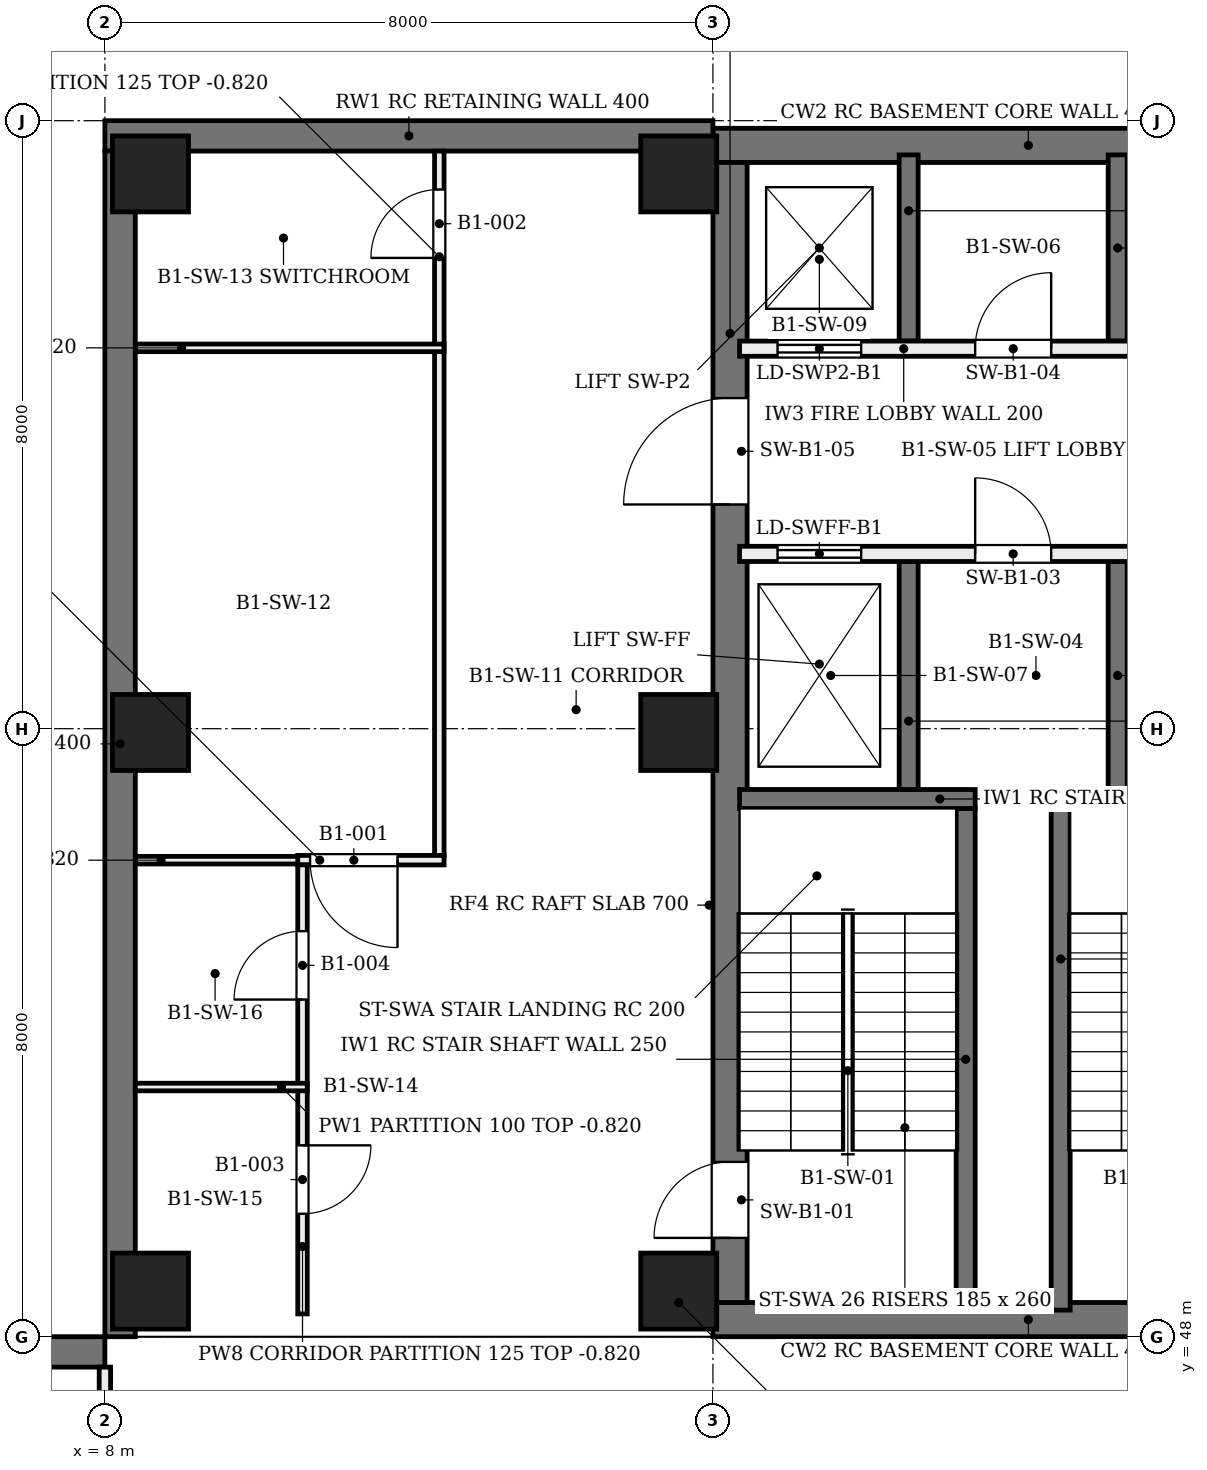
"""IFC4 building model, lengths in metres.
Left out: names, types, materials, properties, quantities, classifications, styles, units other than length and angle.
Written with IfcOpenShell. Run it as: python <this file> out.ifc"""

import sys

from ifc_helpers import new_model, si_unit, direction, frame, frame_2d, origin, origin_2d, place, context, subcontext, project, spatial, rectangle, extrude, element, fill, save


model = new_model("IFC4")
c1 = context("Model", 3, precision=1e-05, world=origin(), true_north=direction((0.0, 1.0)))
c2 = subcontext(c1, "Body", "Model", "MODEL_VIEW")
j1 = project(units=[si_unit("LENGTHUNIT", "METRE"), si_unit("PLANEANGLEUNIT", "RADIAN")], contexts=[c1])
p1 = place(None, origin())
s1 = spatial("IfcSite", under=j1, at=p1, CompositionType="ELEMENT")
p2 = place(p1, origin())
s2 = spatial("IfcBuilding", under=s1, at=p2, CompositionType="ELEMENT")
p3 = place(p2, frame((0.0, 0.0, -4.8)))
s3 = spatial("IfcBuildingStorey", under=s2, at=p3, CompositionType="ELEMENT", Elevation=-4.8)
for number, where, z_axis, x_axis in (
    (1, (16.0, 48.225, 0.0), (0.0, 0.0, 1.0), (1.0, 0.0, 0.0)),
    (2, (16.0, 63.675, 0.0), (0.0, 0.0, 1.0), (1.0, 0.0, 0.0)),
):
    element("IfcWall", number, at=place(p3, frame(where, z_axis=z_axis, x_axis=x_axis)), inside=s3, PredefinedType="SHEAR", context=c2, shape_type="SweptSolid", body=[
        extrude(rectangle(XDim=8.3, YDim=0.45, at=frame_2d((4.15, 0.0))), origin(), (0.0, 0.0, 1.0), 4.58),
    ])
p4 = place(p3, frame((16.225, 48.45, 0.0), z_axis=(0.0, 0.0, 1.0), x_axis=(0.0, 1.0, 0.0)))
e3 = element("IfcWall", 3, at=p4, inside=s3, PredefinedType="SHEAR", context=c2, shape_type="SweptSolid", body=[
    extrude(rectangle(XDim=15.0, YDim=0.45, at=frame_2d((7.5, 0.0))), origin(), (0.0, 0.0, 1.0), 4.58),
])
p5 = place(p4, frame((0.85, 0.0, 0.0)))
e4 = element("IfcOpeningElement", 4, at=p5, cuts=e3, PredefinedType="OPENING", context=c2, shape_type="SweptSolid", body=[
    extrude(rectangle(XDim=1.0, YDim=2.1, at=frame_2d((0.5, 1.05))), frame((0.0, 0.235, 0.0), z_axis=(0.0, -1.0, 0.0), x_axis=(1.0, 0.0, 0.0)), (0.0, 0.0, 1.0), 0.47),
])
p6 = place(p4, frame((10.5, 0.0, 0.0)))
e5 = element("IfcOpeningElement", 5, at=p6, cuts=e3, PredefinedType="OPENING", context=c2, shape_type="SweptSolid", body=[
    extrude(rectangle(XDim=1.4, YDim=2.1, at=frame_2d((0.7, 1.05))), frame((0.0, 0.235, 0.0), z_axis=(0.0, -1.0, 0.0), x_axis=(1.0, 0.0, 0.0)), (0.0, 0.0, 1.0), 0.47),
])
for number, where, z_axis, x_axis in (
    (6, (8.6, 48.6, 0.0), (0.0, 0.0, 1.0), (1.0, 0.0, 0.0)),
    (7, (8.6, 55.95, 0.0), (0.0, 0.0, 1.0), (1.0, 0.0, 0.0)),
    (8, (8.6, 63.3, 0.0), (0.0, 0.0, 1.0), (1.0, 0.0, 0.0)),
    (9, (15.55, 48.6, 0.0), (0.0, 0.0, 1.0), (1.0, 0.0, 0.0)),
    (10, (15.55, 55.95, 0.0), (0.0, 0.0, 1.0), (1.0, 0.0, 0.0)),
    (11, (15.55, 63.3, 0.0), (0.0, 0.0, 1.0), (1.0, 0.0, 0.0)),
):
    element("IfcColumn", number, at=place(p3, frame(where, z_axis=z_axis, x_axis=x_axis)), inside=s3, PredefinedType="COLUMN", context=c2, shape_type="SweptSolid", body=[
        extrude(rectangle(XDim=1.0, YDim=1.0, at=origin_2d()), origin(), (0.0, 0.0, 1.0), 4.8),
    ])
p7 = place(p3, frame((0.0, 47.8, 0.0), z_axis=(0.0, 0.0, 1.0), x_axis=(1.0, 0.0, 0.0)))
e12 = element("IfcWall", 12, at=p7, inside=s3, PredefinedType="SOLIDWALL", context=c2, shape_type="SweptSolid", body=[
    extrude(rectangle(XDim=8.0, YDim=0.4, at=frame_2d((4.0, 0.0))), origin(), (0.0, 0.0, 1.0), 4.38),
])
p8 = place(p3, frame((8.0, 63.8, 0.0), z_axis=(0.0, 0.0, 1.0), x_axis=(1.0, 0.0, 0.0)))
e13 = element("IfcWall", 13, at=p8, inside=s3, PredefinedType="SOLIDWALL", context=c2, shape_type="SweptSolid", body=[
    extrude(rectangle(XDim=8.0, YDim=0.4, at=frame_2d((4.0, 0.0))), origin(), (0.0, 0.0, 1.0), 4.55),
])
p9 = place(p3, frame((8.2, 48.0, 0.0), z_axis=(0.0, 0.0, 1.0), x_axis=(0.0, 1.0, 0.0)))
e14 = element("IfcWall", 14, at=p9, inside=s3, PredefinedType="SOLIDWALL", context=c2, shape_type="SweptSolid", body=[
    extrude(rectangle(XDim=15.6, YDim=0.4, at=frame_2d((7.8, 0.0))), origin(), (0.0, 0.0, 1.0), 4.55),
])
for number, where, z_axis, x_axis in (
    (15, (19.325, 48.35, 0.0), (0.0, 0.0, 1.0), (0.0, 1.0, 0.0)),
    (16, (20.575, 48.35, 0.0), (0.0, 0.0, 1.0), (0.0, 1.0, 0.0)),
):
    element("IfcWall", number, at=place(p3, frame(where, z_axis=z_axis, x_axis=x_axis)), inside=s3, PredefinedType="SOLIDWALL", context=c2, shape_type="SweptSolid", body=[
        extrude(rectangle(XDim=6.6, YDim=0.25, at=frame_2d((3.3, 0.0))), origin(), (0.0, 0.0, 1.0), 4.55),
    ])
p10 = place(p3, frame((16.35, 55.075, 0.0), z_axis=(0.0, 0.0, 1.0), x_axis=(1.0, 0.0, 0.0)))
e17 = element("IfcWall", 17, at=p10, inside=s3, PredefinedType="SOLIDWALL", context=c2, shape_type="SweptSolid", body=[
    extrude(rectangle(XDim=3.1, YDim=0.25, at=frame_2d((1.55, 0.0))), origin(), (0.0, 0.0, 1.0), 4.55),
])
p11 = place(p3, frame((20.45, 55.075, 0.0), z_axis=(0.0, 0.0, 1.0), x_axis=(1.0, 0.0, 0.0)))
e18 = element("IfcWall", 18, at=p11, inside=s3, PredefinedType="SOLIDWALL", context=c2, shape_type="SweptSolid", body=[
    extrude(rectangle(XDim=3.1, YDim=0.25, at=frame_2d((1.55, 0.0))), origin(), (0.0, 0.0, 1.0), 4.55),
])
p12 = place(p3, frame((18.575, 55.2, 0.0), z_axis=(0.0, 0.0, 1.0), x_axis=(0.0, 1.0, 0.0)))
e19 = element("IfcWall", 19, at=p12, inside=s3, PredefinedType="SOLIDWALL", context=c2, shape_type="SweptSolid", body=[
    extrude(rectangle(XDim=3.0, YDim=0.25, at=frame_2d((1.5, 0.0))), origin(), (0.0, 0.0, 1.0), 4.55),
])
p13 = place(p3, frame((18.575, 61.1, 0.0), z_axis=(0.0, 0.0, 1.0), x_axis=(0.0, 1.0, 0.0)))
e20 = element("IfcWall", 20, at=p13, inside=s3, PredefinedType="SOLIDWALL", context=c2, shape_type="SweptSolid", body=[
    extrude(rectangle(XDim=2.45, YDim=0.25, at=frame_2d((1.225, 0.0))), origin(), (0.0, 0.0, 1.0), 4.55),
])
p14 = place(p3, frame((21.325, 55.2, 0.0), z_axis=(0.0, 0.0, 1.0), x_axis=(0.0, 1.0, 0.0)))
e21 = element("IfcWall", 21, at=p14, inside=s3, PredefinedType="SOLIDWALL", context=c2, shape_type="SweptSolid", body=[
    extrude(rectangle(XDim=3.0, YDim=0.25, at=frame_2d((1.5, 0.0))), origin(), (0.0, 0.0, 1.0), 4.55),
])
p15 = place(p3, frame((21.325, 61.1, 0.0), z_axis=(0.0, 0.0, 1.0), x_axis=(0.0, 1.0, 0.0)))
e22 = element("IfcWall", 22, at=p15, inside=s3, PredefinedType="SOLIDWALL", context=c2, shape_type="SweptSolid", body=[
    extrude(rectangle(XDim=2.45, YDim=0.25, at=frame_2d((1.225, 0.0))), origin(), (0.0, 0.0, 1.0), 4.55),
])
p16 = place(p3, frame((16.35, 58.3, 0.0), z_axis=(0.0, 0.0, 1.0), x_axis=(1.0, 0.0, 0.0)))
e23 = element("IfcWall", 23, at=p16, inside=s3, PredefinedType="SOLIDWALL", context=c2, shape_type="SweptSolid", body=[
    extrude(rectangle(XDim=7.2, YDim=0.2, at=frame_2d((3.6, 0.0))), origin(), (0.0, 0.0, 1.0), 4.55),
])
p17 = place(p16, frame((0.5, 0.0, 0.0)))
e24 = element("IfcOpeningElement", 24, at=p17, cuts=e23, PredefinedType="OPENING", context=c2, shape_type="SweptSolid", body=[
    extrude(rectangle(XDim=1.1, YDim=2.1, at=frame_2d((0.55, 1.05))), frame((0.0, 0.11, 0.0), z_axis=(0.0, -1.0, 0.0), x_axis=(1.0, 0.0, 0.0)), (0.0, 0.0, 1.0), 0.22),
])
p18 = place(p16, frame((5.6, 0.0, 0.0)))
e25 = element("IfcOpeningElement", 25, at=p18, cuts=e23, PredefinedType="OPENING", context=c2, shape_type="SweptSolid", body=[
    extrude(rectangle(XDim=1.1, YDim=2.1, at=frame_2d((0.55, 1.05))), frame((0.0, 0.11, 0.0), z_axis=(0.0, -1.0, 0.0), x_axis=(1.0, 0.0, 0.0)), (0.0, 0.0, 1.0), 0.22),
])
p19 = place(p16, frame((3.1, 0.0, 0.0)))
e26 = element("IfcOpeningElement", 26, at=p19, cuts=e23, PredefinedType="OPENING", context=c2, shape_type="SweptSolid", body=[
    extrude(rectangle(XDim=1.0, YDim=2.1, at=frame_2d((0.5, 1.05))), frame((0.0, 0.11, 0.0), z_axis=(0.0, -1.0, 0.0), x_axis=(1.0, 0.0, 0.0)), (0.0, 0.0, 1.0), 0.22),
])
p20 = place(p3, frame((16.35, 61.0, 0.0), z_axis=(0.0, 0.0, 1.0), x_axis=(1.0, 0.0, 0.0)))
e27 = element("IfcWall", 27, at=p20, inside=s3, PredefinedType="SOLIDWALL", context=c2, shape_type="SweptSolid", body=[
    extrude(rectangle(XDim=7.2, YDim=0.2, at=frame_2d((3.6, 0.0))), origin(), (0.0, 0.0, 1.0), 4.55),
])
p21 = place(p20, frame((0.5, 0.0, 0.0)))
e28 = element("IfcOpeningElement", 28, at=p21, cuts=e27, PredefinedType="OPENING", context=c2, shape_type="SweptSolid", body=[
    extrude(rectangle(XDim=1.1, YDim=2.1, at=frame_2d((0.55, 1.05))), frame((0.0, 0.11, 0.0), z_axis=(0.0, -1.0, 0.0), x_axis=(1.0, 0.0, 0.0)), (0.0, 0.0, 1.0), 0.22),
])
p22 = place(p20, frame((5.6, 0.0, 0.0)))
e29 = element("IfcOpeningElement", 29, at=p22, cuts=e27, PredefinedType="OPENING", context=c2, shape_type="SweptSolid", body=[
    extrude(rectangle(XDim=1.1, YDim=2.1, at=frame_2d((0.55, 1.05))), frame((0.0, 0.11, 0.0), z_axis=(0.0, -1.0, 0.0), x_axis=(1.0, 0.0, 0.0)), (0.0, 0.0, 1.0), 0.22),
])
p23 = place(p20, frame((3.1, 0.0, 0.0)))
e30 = element("IfcOpeningElement", 30, at=p23, cuts=e27, PredefinedType="OPENING", context=c2, shape_type="SweptSolid", body=[
    extrude(rectangle(XDim=1.0, YDim=2.1, at=frame_2d((0.5, 1.05))), frame((0.0, 0.11, 0.0), z_axis=(0.0, -1.0, 0.0), x_axis=(1.0, 0.0, 0.0)), (0.0, 0.0, 1.0), 0.22),
])
p24 = place(p3, frame((12.4, 54.333, 0.0), z_axis=(0.0, 0.0, 1.0), x_axis=(0.0, 1.0, 0.0)))
e31 = element("IfcWall", 31, at=p24, inside=s3, PredefinedType="PARTITIONING", context=c2, shape_type="SweptSolid", body=[
    extrude(rectangle(XDim=9.267, YDim=0.125, at=frame_2d((4.634, 0.0))), origin(), (0.0, 0.0, 1.0), 3.98),
])
p25 = place(p24, frame((7.862, 0.0, 0.0)))
e32 = element("IfcOpeningElement", 32, at=p25, cuts=e31, PredefinedType="OPENING", context=c2, shape_type="SweptSolid", body=[
    extrude(rectangle(XDim=0.9, YDim=2.1, at=frame_2d((0.45, 1.05))), frame((0.0, 0.073, 0.0), z_axis=(0.0, -1.0, 0.0), x_axis=(1.0, 0.0, 0.0)), (0.0, 0.0, 1.0), 0.145),
])
p26 = place(p3, frame((8.4, 54.27, 0.0), z_axis=(0.0, 0.0, 1.0), x_axis=(1.0, 0.0, 0.0)))
e33 = element("IfcWall", 33, at=p26, inside=s3, PredefinedType="PARTITIONING", context=c2, shape_type="SweptSolid", body=[
    extrude(rectangle(XDim=2.263, YDim=0.1, at=frame_2d((1.131, 0.0))), origin(), (0.0, 0.0, 1.0), 3.98),
])
p27 = place(p3, frame((10.538, 54.27, 0.0), z_axis=(0.0, 0.0, 1.0), x_axis=(1.0, 0.0, 0.0)))
e34 = element("IfcWall", 34, at=p27, inside=s3, PredefinedType="PARTITIONING", context=c2, shape_type="SweptSolid", body=[
    extrude(rectangle(XDim=1.925, YDim=0.125, at=frame_2d((0.962, 0.0))), origin(), (0.0, 0.0, 1.0), 4.56),
])
p28 = place(p27, frame((0.163, 0.0, 0.0)))
e35 = element("IfcOpeningElement", 35, at=p28, cuts=e34, PredefinedType="OPENING", context=c2, shape_type="SweptSolid", body=[
    extrude(rectangle(XDim=1.15, YDim=2.1, at=frame_2d((0.575, 1.05))), frame((0.0, 0.073, 0.0), z_axis=(0.0, -1.0, 0.0), x_axis=(1.0, 0.0, 0.0)), (0.0, 0.0, 1.0), 0.145),
])
p29 = place(p3, frame((8.4, 61.011, 0.0), z_axis=(0.0, 0.0, 1.0), x_axis=(1.0, 0.0, 0.0)))
e36 = element("IfcWall", 36, at=p29, inside=s3, PredefinedType="PARTITIONING", context=c2, shape_type="SweptSolid", body=[
    extrude(rectangle(XDim=4.062, YDim=0.1, at=frame_2d((2.031, 0.0))), origin(), (0.0, 0.0, 1.0), 3.98),
])
p30 = place(p3, frame((10.6, 48.3, 0.0), z_axis=(0.0, 0.0, 1.0), x_axis=(0.0, 1.0, 0.0)))
e37 = element("IfcWall", 37, at=p30, inside=s3, PredefinedType="PARTITIONING", context=c2, shape_type="SweptSolid", body=[
    extrude(rectangle(XDim=5.908, YDim=0.125, at=frame_2d((2.954, 0.0))), origin(), (0.0, 0.0, 1.0), 3.98),
])
p31 = place(p30, frame((1.318, 0.0, 0.0)))
e38 = element("IfcOpeningElement", 38, at=p31, cuts=e37, PredefinedType="OPENING", context=c2, shape_type="SweptSolid", body=[
    extrude(rectangle(XDim=0.9, YDim=2.1, at=frame_2d((0.45, 1.05))), frame((0.0, 0.073, 0.0), z_axis=(0.0, -1.0, 0.0), x_axis=(1.0, 0.0, 0.0)), (0.0, 0.0, 1.0), 0.145),
])
p32 = place(p30, frame((4.136, 0.0, 0.0)))
e39 = element("IfcOpeningElement", 39, at=p32, cuts=e37, PredefinedType="OPENING", context=c2, shape_type="SweptSolid", body=[
    extrude(rectangle(XDim=0.9, YDim=2.1, at=frame_2d((0.45, 1.05))), frame((0.0, 0.073, 0.0), z_axis=(0.0, -1.0, 0.0), x_axis=(1.0, 0.0, 0.0)), (0.0, 0.0, 1.0), 0.145),
])
p33 = place(p3, frame((8.4, 51.285, 0.0), z_axis=(0.0, 0.0, 1.0), x_axis=(1.0, 0.0, 0.0)))
e40 = element("IfcWall", 40, at=p33, inside=s3, PredefinedType="PARTITIONING", context=c2, shape_type="SweptSolid", body=[
    extrude(rectangle(XDim=2.263, YDim=0.1, at=frame_2d((1.131, 0.0))), origin(), (0.0, 0.0, 1.0), 3.98),
])
p34 = place(p3, frame((8.0, 46.655, 0.0), z_axis=(0.0, 0.0, 1.0), x_axis=(0.0, 1.0, 0.0)))
e41 = element("IfcWall", 41, at=p34, inside=s3, PredefinedType="PARTITIONING", context=c2, shape_type="SweptSolid", body=[
    extrude(rectangle(XDim=0.945, YDim=0.15, at=frame_2d((0.473, 0.0))), origin(), (0.0, 0.0, 1.0), 4.36),
])
p35 = place(p5, origin())
e42 = element("IfcDoor", 42, at=p35, inside=s3, OperationType="SINGLE_SWING_LEFT", PredefinedType="DOOR", context=c2, shape_type="SweptSolid", body=[
    extrude(rectangle(XDim=1.0, YDim=2.1, at=frame_2d((0.5, 1.05))), frame((0.0, 0.025, 0.0), z_axis=(0.0, -1.0, 0.0), x_axis=(1.0, 0.0, 0.0)), (0.0, 0.0, 1.0), 0.05),
])
fill(e4, e42)
p36 = place(p17, origin())
e43 = element("IfcDoor", 43, at=p36, inside=s3, OperationType="DOUBLE_DOOR_SLIDING", PredefinedType="DOOR", context=c2, shape_type="SweptSolid", body=[
    extrude(rectangle(XDim=1.1, YDim=2.1, at=frame_2d((0.55, 1.05))), frame((0.0, 0.025, 0.0), z_axis=(0.0, -1.0, 0.0), x_axis=(1.0, 0.0, 0.0)), (0.0, 0.0, 1.0), 0.05),
])
fill(e24, e43)
p37 = place(p21, frame((1.1, 0.0, 0.0), z_axis=(0.0, 0.0, 1.0), x_axis=(-1.0, 0.0, 0.0)))
e44 = element("IfcDoor", 44, at=p37, inside=s3, OperationType="DOUBLE_DOOR_SLIDING", PredefinedType="DOOR", context=c2, shape_type="SweptSolid", body=[
    extrude(rectangle(XDim=1.1, YDim=2.1, at=frame_2d((0.55, 1.05))), frame((0.0, 0.025, 0.0), z_axis=(0.0, -1.0, 0.0), x_axis=(1.0, 0.0, 0.0)), (0.0, 0.0, 1.0), 0.05),
])
fill(e28, e44)
p38 = place(p19, origin())
e45 = element("IfcDoor", 45, at=p38, inside=s3, OperationType="SINGLE_SWING_LEFT", PredefinedType="DOOR", context=c2, shape_type="SweptSolid", body=[
    extrude(rectangle(XDim=1.0, YDim=2.1, at=frame_2d((0.5, 1.05))), frame((0.0, 0.025, 0.0), z_axis=(0.0, -1.0, 0.0), x_axis=(1.0, 0.0, 0.0)), (0.0, 0.0, 1.0), 0.05),
])
fill(e26, e45)
p39 = place(p23, frame((1.0, 0.0, 0.0), z_axis=(0.0, 0.0, 1.0), x_axis=(-1.0, 0.0, 0.0)))
e46 = element("IfcDoor", 46, at=p39, inside=s3, OperationType="SINGLE_SWING_RIGHT", PredefinedType="DOOR", context=c2, shape_type="SweptSolid", body=[
    extrude(rectangle(XDim=1.0, YDim=2.1, at=frame_2d((0.5, 1.05))), frame((0.0, 0.025, 0.0), z_axis=(0.0, -1.0, 0.0), x_axis=(1.0, 0.0, 0.0)), (0.0, 0.0, 1.0), 0.05),
])
fill(e30, e46)
p40 = place(p6, origin())
e47 = element("IfcDoor", 47, at=p40, inside=s3, OperationType="SINGLE_SWING_LEFT", PredefinedType="DOOR", context=c2, shape_type="SweptSolid", body=[
    extrude(rectangle(XDim=1.4, YDim=2.1, at=frame_2d((0.7, 1.05))), frame((0.0, 0.025, 0.0), z_axis=(0.0, -1.0, 0.0), x_axis=(1.0, 0.0, 0.0)), (0.0, 0.0, 1.0), 0.05),
])
fill(e5, e47)
p41 = place(p28, origin())
e48 = element("IfcDoor", 48, at=p41, inside=s3, OperationType="SINGLE_SWING_RIGHT", PredefinedType="DOOR", context=c2, shape_type="SweptSolid", body=[
    extrude(rectangle(XDim=1.15, YDim=2.1, at=frame_2d((0.575, 1.05))), frame((0.0, 0.025, 0.0), z_axis=(0.0, -1.0, 0.0), x_axis=(1.0, 0.0, 0.0)), (0.0, 0.0, 1.0), 0.05),
])
fill(e35, e48)
p42 = place(p25, origin())
e49 = element("IfcDoor", 49, at=p42, inside=s3, OperationType="SINGLE_SWING_LEFT", PredefinedType="DOOR", context=c2, shape_type="SweptSolid", body=[
    extrude(rectangle(XDim=0.9, YDim=2.1, at=frame_2d((0.45, 1.05))), frame((0.0, 0.025, 0.0), z_axis=(0.0, -1.0, 0.0), x_axis=(1.0, 0.0, 0.0)), (0.0, 0.0, 1.0), 0.05),
])
fill(e32, e49)
p43 = place(p31, origin())
e50 = element("IfcDoor", 50, at=p43, inside=s3, OperationType="SINGLE_SWING_RIGHT", PredefinedType="DOOR", context=c2, shape_type="SweptSolid", body=[
    extrude(rectangle(XDim=0.9, YDim=2.1, at=frame_2d((0.45, 1.05))), frame((0.0, 0.025, 0.0), z_axis=(0.0, -1.0, 0.0), x_axis=(1.0, 0.0, 0.0)), (0.0, 0.0, 1.0), 0.05),
])
fill(e38, e50)
p44 = place(p32, origin())
e51 = element("IfcDoor", 51, at=p44, inside=s3, OperationType="SINGLE_SWING_LEFT", PredefinedType="DOOR", context=c2, shape_type="SweptSolid", body=[
    extrude(rectangle(XDim=0.9, YDim=2.1, at=frame_2d((0.45, 1.05))), frame((0.0, 0.025, 0.0), z_axis=(0.0, -1.0, 0.0), x_axis=(1.0, 0.0, 0.0)), (0.0, 0.0, 1.0), 0.05),
])
fill(e39, e51)
save(model, sys.argv[1])
